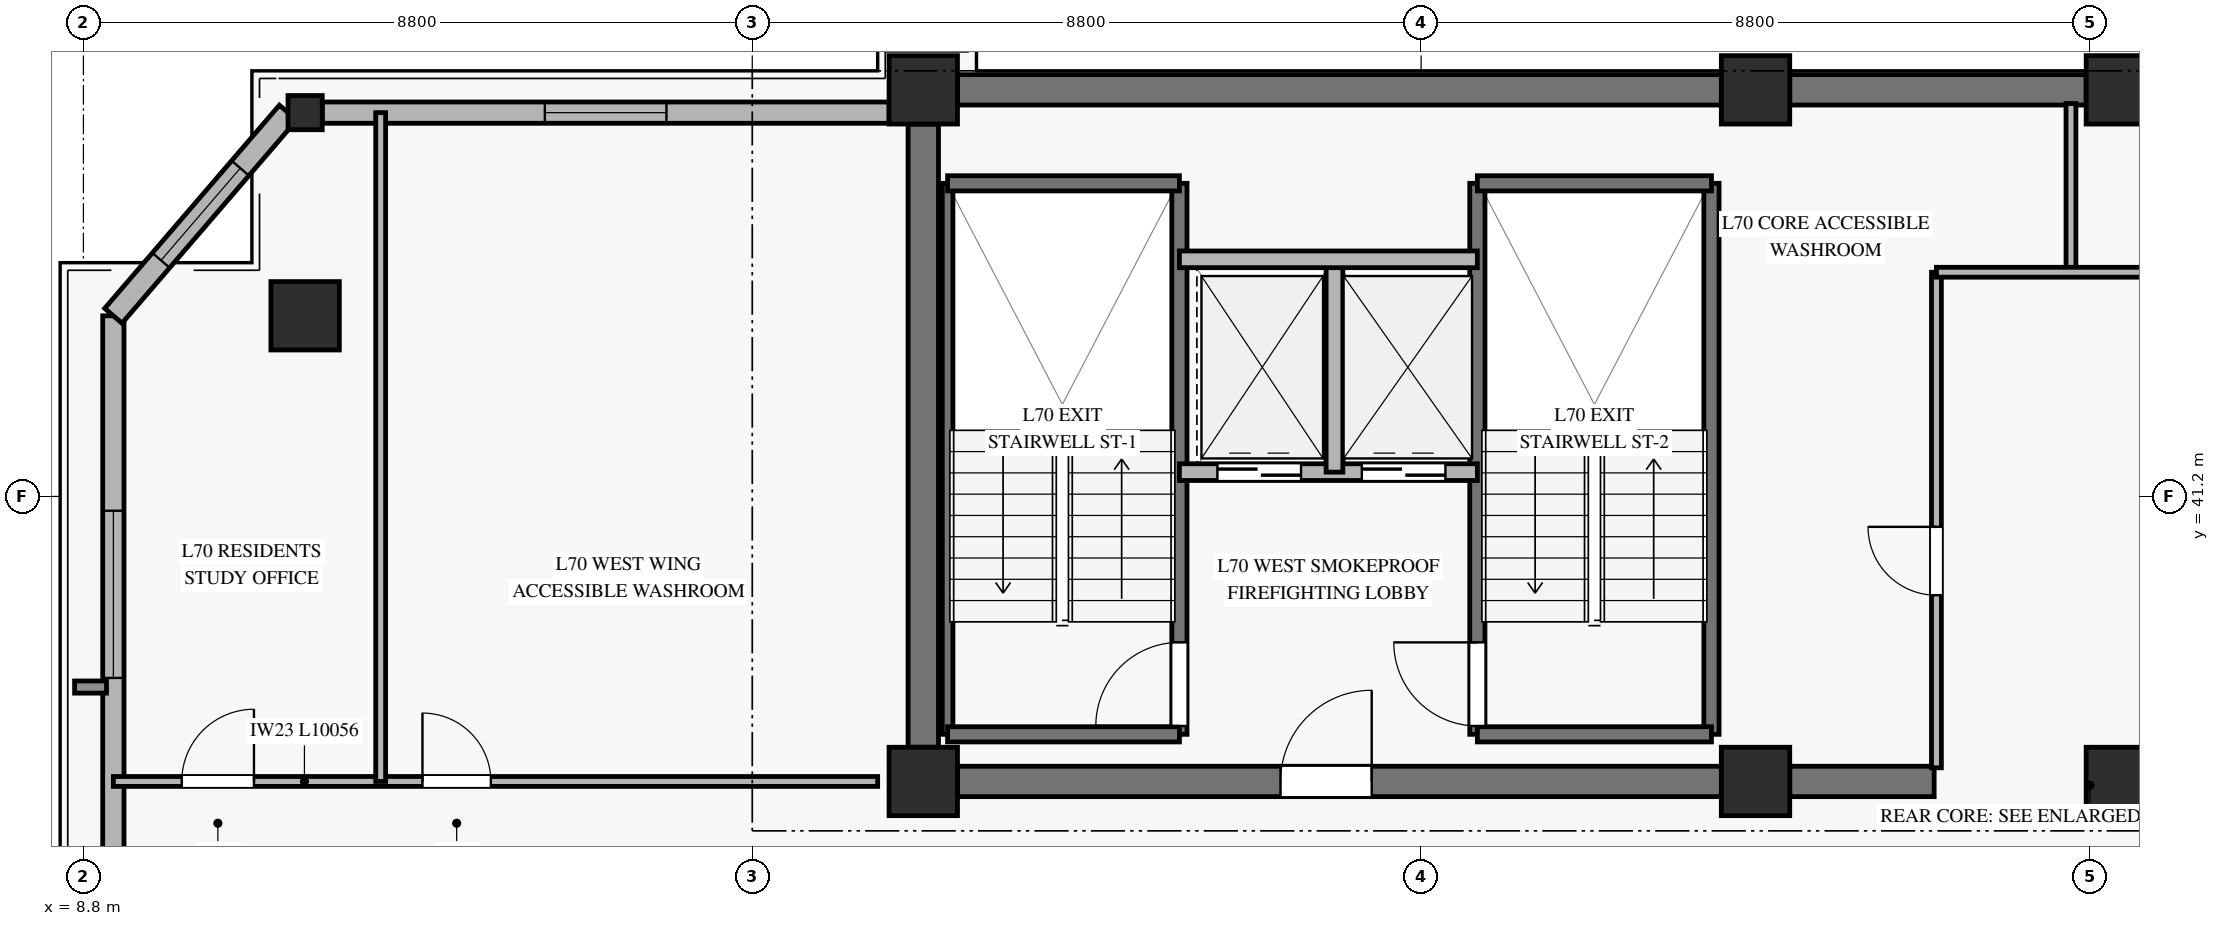
"""IFC4 building model, lengths in metres.
Left out: names, types, materials, properties, quantities, classifications, styles, units other than length and angle.
Written with IfcOpenShell. Run it as: python <this file> out.ifc"""

import sys

from ifc_helpers import new_model, si_unit, direction, frame, frame_2d, origin, origin_2d, place, context, subcontext, project, spatial, rectangle, hollow_rectangle, extrude, source, transform, mapped, element, fill, save


model = new_model("IFC4")
c1 = context("Model", 3, precision=1e-05, world=origin(), true_north=direction((0.0, 1.0)))
c2 = subcontext(c1, "Body", "Model", "MODEL_VIEW")
j1 = project(units=[si_unit("LENGTHUNIT", "METRE"), si_unit("PLANEANGLEUNIT", "RADIAN")], contexts=[c1])
p1 = place(None, origin())
s1 = spatial("IfcSite", under=j1, at=p1, CompositionType="ELEMENT")
p2 = place(p1, origin())
s2 = spatial("IfcBuilding", under=s1, at=p2, CompositionType="ELEMENT")
p3 = place(p2, frame((0.0, 0.0, 272.3)))
s3 = spatial("IfcBuildingStorey", under=s2, at=p3, CompositionType="ELEMENT", Elevation=272.3)
m1 = source(origin(), c2, "Body", "SweptSolid", [
    extrude(rectangle(XDim=0.9, YDim=0.9, at=origin_2d()), origin(), (0.0, 0.0, 1.0), 3.185),
])
for number, where, z_axis, x_axis in (
    (1, (19.85, 37.45, 0.0), (0.0, 0.0, 1.0), (1.0, 0.0, 0.0)),
    (2, (19.85, 46.55, 0.0), (0.0, 0.0, 1.0), (1.0, 0.0, 0.0)),
    (3, (30.8, 37.45, 0.0), (0.0, 0.0, 1.0), (1.0, 0.0, 0.0)),
    (4, (30.8, 46.55, 0.0), (0.0, 0.0, 1.0), (1.0, 0.0, 0.0)),
    (5, (35.6, 37.45, 0.0), (0.0, 0.0, 1.0), (1.0, 0.0, 0.0)),
    (6, (35.6, 46.55, 0.0), (0.0, 0.0, 1.0), (1.0, 0.0, 0.0)),
):
    element("IfcColumn", number, at=place(p3, frame(where, z_axis=z_axis, x_axis=x_axis)), inside=s3, PredefinedType="PILASTER", context=c2, shape_type="MappedRepresentation", body=[
        mapped(m1, transform((0.0, 0.0, 0.0), x_axis=(1.0, 0.0, 0.0), y_axis=(0.0, 1.0, 0.0), z_axis=(0.0, 0.0, 1.0), scale=1.0)),
    ])
p4 = place(p3, frame((20.3, 46.55, 0.0), z_axis=(0.0, 0.0, 1.0), x_axis=(1.0, 0.0, 0.0)))
e7 = element("IfcWall", 7, at=p4, inside=s3, PredefinedType="SHEAR", context=c2, shape_type="SweptSolid", body=[
    extrude(rectangle(XDim=10.05, YDim=0.4, at=frame_2d((5.025, 0.0))), origin(), (0.0, 0.0, 1.0), 3.185),
])
p5 = place(p3, frame((31.25, 46.55, 0.0), z_axis=(0.0, 0.0, 1.0), x_axis=(1.0, 0.0, 0.0)))
e8 = element("IfcWall", 8, at=p5, inside=s3, PredefinedType="SHEAR", context=c2, shape_type="SweptSolid", body=[
    extrude(rectangle(XDim=3.9, YDim=0.4, at=frame_2d((1.95, 0.0))), origin(), (0.0, 0.0, 1.0), 3.185),
])
p6 = place(p3, frame((20.3, 37.45, 0.0), z_axis=(0.0, 0.0, 1.0), x_axis=(1.0, 0.0, 0.0)))
e9 = element("IfcWall", 9, at=p6, inside=s3, PredefinedType="SHEAR", context=c2, shape_type="SweptSolid", body=[
    extrude(rectangle(XDim=10.05, YDim=0.4, at=frame_2d((5.025, 0.0))), origin(), (0.0, 0.0, 1.0), 3.185),
])
p7 = place(p6, frame((4.25, 0.0, 0.0)))
e10 = element("IfcOpeningElement", 10, at=p7, cuts=e9, PredefinedType="OPENING", context=c2, shape_type="SweptSolid", body=[
    extrude(rectangle(XDim=1.2, YDim=2.15, at=frame_2d((0.6, 1.075))), frame((0.0, 0.21, 0.0), z_axis=(0.0, -1.0, 0.0), x_axis=(1.0, 0.0, 0.0)), (0.0, 0.0, 1.0), 0.42),
])
p8 = place(p3, frame((31.25, 37.45, 0.0), z_axis=(0.0, 0.0, 1.0), x_axis=(1.0, 0.0, 0.0)))
e11 = element("IfcWall", 11, at=p8, inside=s3, PredefinedType="SHEAR", context=c2, shape_type="SweptSolid", body=[
    extrude(rectangle(XDim=1.9, YDim=0.4, at=frame_2d((0.95, 0.0))), origin(), (0.0, 0.0, 1.0), 3.185),
])
p9 = place(p3, frame((19.85, 37.9, 0.0), z_axis=(0.0, 0.0, 1.0), x_axis=(0.0, 1.0, 0.0)))
e12 = element("IfcWall", 12, at=p9, inside=s3, PredefinedType="SHEAR", context=c2, shape_type="SweptSolid", body=[
    extrude(rectangle(XDim=8.2, YDim=0.4, at=frame_2d((4.1, 0.0))), origin(), (0.0, 0.0, 1.0), 3.185),
])
m2 = source(origin(), c2, "Body", "SweptSolid", [
    extrude(hollow_rectangle(XDim=0.9, YDim=0.9, WallThickness=0.04, at=origin_2d()), origin(), (0.0, 0.0, 1.0), 3.185),
])
p10 = place(p3, frame((11.717, 43.577, 0.0), z_axis=(0.0, 0.0, 1.0), x_axis=(1.0, 0.0, 0.0)))
e13 = element("IfcColumn", 13, at=p10, inside=s3, PredefinedType="COLUMN", context=c2, shape_type="MappedRepresentation", body=[
    mapped(m2, transform((0.0, 0.0, 0.0), x_axis=(1.0, 0.0, 0.0), y_axis=(0.0, 1.0, 0.0), z_axis=(0.0, 0.0, 1.0), scale=1.0)),
])
m3 = source(origin(), c2, "Body", "SweptSolid", [
    extrude(hollow_rectangle(XDim=0.45, YDim=0.45, WallThickness=0.022, at=origin_2d()), origin(), (0.0, 0.0, 1.0), 3.185),
])
p11 = place(p3, frame((11.717, 46.25, 0.0), z_axis=(0.0, 0.0, 1.0), x_axis=(1.0, 0.0, 0.0)))
e14 = element("IfcColumn", 14, at=p11, inside=s3, PredefinedType="COLUMN", context=c2, shape_type="MappedRepresentation", body=[
    mapped(m3, transform((0.0, 0.0, 0.0), x_axis=(1.0, 0.0, 0.0), y_axis=(0.0, 1.0, 0.0), z_axis=(0.0, 0.0, 1.0), scale=1.0)),
])
p12 = place(p3, frame((9.194, 31.763, 0.0), z_axis=(0.0, 0.0, 1.0), x_axis=(0.0, 1.0, 0.0)))
e15 = element("IfcWall", 15, at=p12, inside=s3, PredefinedType="SOLIDWALL", context=c2, shape_type="SweptSolid", body=[
    extrude(rectangle(XDim=11.814, YDim=0.28, at=frame_2d((5.907, 0.0))), origin(), (0.0, 0.0, 1.0), 2.815),
])
p13 = place(p12, frame((7.049, 0.0, 0.45)))
e16 = element("IfcOpeningElement", 16, at=p13, cuts=e15, PredefinedType="OPENING", context=c2, shape_type="SweptSolid", body=[
    extrude(rectangle(XDim=2.2, YDim=2.1, at=frame_2d((1.1, 1.05))), frame((0.0, 0.15, 0.0), z_axis=(0.0, -1.0, 0.0), x_axis=(1.0, 0.0, 0.0)), (0.0, 0.0, 1.0), 0.3),
])
p14 = place(p3, frame((11.942, 46.25, 0.0), z_axis=(0.0, 0.0, 1.0), x_axis=(1.0, 0.0, 0.0)))
e17 = element("IfcWall", 17, at=p14, inside=s3, PredefinedType="SOLIDWALL", context=c2, shape_type="SweptSolid", body=[
    extrude(rectangle(XDim=7.458, YDim=0.28, at=frame_2d((3.729, 0.0))), origin(), (0.0, 0.0, 1.0), 2.815),
])
p15 = place(p14, frame((2.929, 0.0, 0.45)))
e18 = element("IfcOpeningElement", 18, at=p15, cuts=e17, PredefinedType="OPENING", context=c2, shape_type="SweptSolid", body=[
    extrude(rectangle(XDim=1.6, YDim=2.0, at=frame_2d((0.8, 1.0))), frame((0.0, 0.15, 0.0), z_axis=(0.0, -1.0, 0.0), x_axis=(1.0, 0.0, 0.0)), (0.0, 0.0, 1.0), 0.3),
])
p16 = place(p3, frame((11.492, 46.25, 0.0), z_axis=(0.0, 0.0, 1.0), x_axis=(-0.651874424669, -0.75832693112, 0.0)))
e19 = element("IfcWall", 19, at=p16, inside=s3, PredefinedType="SOLIDWALL", context=c2, shape_type="SweptSolid", body=[
    extrude(rectangle(XDim=3.525, YDim=0.3, at=frame_2d((1.762, 0.0))), origin(), (0.0, 0.0, 1.0), 2.815),
])
p17 = place(p16, frame((0.963, 0.0, 0.45)))
e20 = element("IfcOpeningElement", 20, at=p17, cuts=e19, PredefinedType="OPENING", context=c2, shape_type="SweptSolid", body=[
    extrude(rectangle(XDim=1.6, YDim=2.0, at=frame_2d((0.8, 1.0))), frame((0.0, 0.16, 0.0), z_axis=(0.0, -1.0, 0.0), x_axis=(1.0, 0.0, 0.0)), (0.0, 0.0, 1.0), 0.32),
])
p18 = place(p3, frame((20.17, 38.07, 0.0), z_axis=(0.0, 0.0, 1.0), x_axis=(0.0, 1.0, 0.0)))
e21 = element("IfcWall", 21, at=p18, inside=s3, PredefinedType="SOLIDWALL", context=c2, shape_type="SweptSolid", body=[
    extrude(rectangle(XDim=7.25, YDim=0.14, at=frame_2d((3.625, 0.0))), origin(), (0.0, 0.0, 1.0), 3.4),
])
p19 = place(p3, frame((23.22, 38.07, 0.0), z_axis=(0.0, 0.0, 1.0), x_axis=(0.0, 1.0, 0.0)))
e22 = element("IfcWall", 22, at=p19, inside=s3, PredefinedType="SOLIDWALL", context=c2, shape_type="SweptSolid", body=[
    extrude(rectangle(XDim=7.25, YDim=0.2, at=frame_2d((3.625, 0.0))), origin(), (0.0, 0.0, 1.0), 3.4),
])
p20 = place(p19, frame((0.11, 0.0, 0.0)))
e23 = element("IfcOpeningElement", 23, at=p20, cuts=e22, PredefinedType="OPENING", context=c2, shape_type="SweptSolid", body=[
    extrude(rectangle(XDim=1.1, YDim=2.15, at=frame_2d((0.55, 1.075))), frame((0.0, 0.11, 0.0), z_axis=(0.0, -1.0, 0.0), x_axis=(1.0, 0.0, 0.0)), (0.0, 0.0, 1.0), 0.22),
])
for number, where, z_axis, x_axis in (
    (24, (20.17, 45.32, 0.0), (0.0, 0.0, 1.0), (1.0, 0.0, 0.0)),
    (25, (20.17, 38.07, 0.0), (0.0, 0.0, 1.0), (1.0, 0.0, 0.0)),
):
    element("IfcWall", number, at=place(p3, frame(where, z_axis=z_axis, x_axis=x_axis)), inside=s3, PredefinedType="SOLIDWALL", context=c2, shape_type="SweptSolid", body=[
        extrude(rectangle(XDim=3.05, YDim=0.2, at=frame_2d((1.525, 0.0))), origin(), (0.0, 0.0, 1.0), 3.4),
    ])
p21 = place(p3, frame((27.14, 38.07, 0.0), z_axis=(0.0, 0.0, 1.0), x_axis=(0.0, 1.0, 0.0)))
e26 = element("IfcWall", 26, at=p21, inside=s3, PredefinedType="SOLIDWALL", context=c2, shape_type="SweptSolid", body=[
    extrude(rectangle(XDim=7.25, YDim=0.2, at=frame_2d((3.625, 0.0))), origin(), (0.0, 0.0, 1.0), 3.4),
])
p22 = place(p21, frame((0.11, 0.0, 0.0)))
e27 = element("IfcOpeningElement", 27, at=p22, cuts=e26, PredefinedType="OPENING", context=c2, shape_type="SweptSolid", body=[
    extrude(rectangle(XDim=1.1, YDim=2.15, at=frame_2d((0.55, 1.075))), frame((0.0, 0.11, 0.0), z_axis=(0.0, -1.0, 0.0), x_axis=(1.0, 0.0, 0.0)), (0.0, 0.0, 1.0), 0.22),
])
p23 = place(p3, frame((30.22, 38.07, 0.0), z_axis=(0.0, 0.0, 1.0), x_axis=(0.0, 1.0, 0.0)))
e28 = element("IfcWall", 28, at=p23, inside=s3, PredefinedType="SOLIDWALL", context=c2, shape_type="SweptSolid", body=[
    extrude(rectangle(XDim=7.25, YDim=0.2, at=frame_2d((3.625, 0.0))), origin(), (0.0, 0.0, 1.0), 3.4),
])
for number, where, z_axis, x_axis in (
    (29, (27.14, 45.32, 0.0), (0.0, 0.0, 1.0), (1.0, 0.0, 0.0)),
    (30, (27.14, 38.07, 0.0), (0.0, 0.0, 1.0), (1.0, 0.0, 0.0)),
):
    element("IfcWall", number, at=place(p3, frame(where, z_axis=z_axis, x_axis=x_axis)), inside=s3, PredefinedType="SOLIDWALL", context=c2, shape_type="SweptSolid", body=[
        extrude(rectangle(XDim=3.08, YDim=0.2, at=frame_2d((1.54, 0.0))), origin(), (0.0, 0.0, 1.0), 3.4),
    ])
p24 = place(p3, frame((23.22, 41.52, 0.0), z_axis=(0.0, 0.0, 1.0), x_axis=(1.0, 0.0, 0.0)))
e31 = element("IfcWall", 31, at=p24, inside=s3, PredefinedType="SOLIDWALL", context=c2, shape_type="SweptSolid", body=[
    extrude(rectangle(XDim=3.92, YDim=0.22, at=frame_2d((1.96, 0.0))), origin(), (0.0, 0.0, 1.0), 3.185),
])
p25 = place(p24, frame((0.5, 0.0, 0.0)))
e32 = element("IfcOpeningElement", 32, at=p25, cuts=e31, PredefinedType="OPENING", context=c2, shape_type="SweptSolid", body=[
    extrude(rectangle(XDim=1.1, YDim=2.2, at=frame_2d((0.55, 1.1))), frame((0.0, 0.12, 0.0), z_axis=(0.0, -1.0, 0.0), x_axis=(1.0, 0.0, 0.0)), (0.0, 0.0, 1.0), 0.24),
])
p26 = place(p24, frame((2.4, 0.0, 0.0)))
e33 = element("IfcOpeningElement", 33, at=p26, cuts=e31, PredefinedType="OPENING", context=c2, shape_type="SweptSolid", body=[
    extrude(rectangle(XDim=1.1, YDim=2.2, at=frame_2d((0.55, 1.1))), frame((0.0, 0.12, 0.0), z_axis=(0.0, -1.0, 0.0), x_axis=(1.0, 0.0, 0.0)), (0.0, 0.0, 1.0), 0.24),
])
p27 = place(p3, frame((25.26, 41.52, 0.0), z_axis=(0.0, 0.0, 1.0), x_axis=(0.0, 1.0, 0.0)))
e34 = element("IfcWall", 34, at=p27, inside=s3, PredefinedType="SOLIDWALL", context=c2, shape_type="SweptSolid", body=[
    extrude(rectangle(XDim=2.8, YDim=0.22, at=frame_2d((1.4, 0.0))), origin(), (0.0, 0.0, 1.0), 3.185),
])
p28 = place(p3, frame((23.22, 44.32, 0.0), z_axis=(0.0, 0.0, 1.0), x_axis=(1.0, 0.0, 0.0)))
e35 = element("IfcWall", 35, at=p28, inside=s3, PredefinedType="SOLIDWALL", context=c2, shape_type="SweptSolid", body=[
    extrude(rectangle(XDim=3.92, YDim=0.22, at=frame_2d((1.96, 0.0))), origin(), (0.0, 0.0, 1.0), 3.185),
])
p29 = place(p3, frame((33.18, 37.63, 0.0), z_axis=(0.0, 0.0, 1.0), x_axis=(0.0, 1.0, 0.0)))
e36 = element("IfcWall", 36, at=p29, inside=s3, PredefinedType="PARTITIONING", context=c2, shape_type="SweptSolid", body=[
    extrude(rectangle(XDim=6.52, YDim=0.13, at=frame_2d((3.26, 0.0))), origin(), (0.0, 0.0, 1.0), 2.27),
])
p30 = place(p29, frame((2.27, 0.0, 0.0)))
e37 = element("IfcOpeningElement", 37, at=p30, cuts=e36, PredefinedType="OPENING", context=c2, shape_type="SweptSolid", body=[
    extrude(rectangle(XDim=0.9, YDim=2.1, at=frame_2d((0.45, 1.05))), frame((0.0, 0.075, 0.0), z_axis=(0.0, -1.0, 0.0), x_axis=(1.0, 0.0, 0.0)), (0.0, 0.0, 1.0), 0.15),
])
p31 = place(p3, frame((34.95, 44.15, 0.0), z_axis=(0.0, 0.0, 1.0), x_axis=(0.0, 1.0, 0.0)))
e38 = element("IfcWall", 38, at=p31, inside=s3, PredefinedType="PARTITIONING", context=c2, shape_type="SweptSolid", body=[
    extrude(rectangle(XDim=2.22, YDim=0.13, at=frame_2d((1.11, 0.0))), origin(), (0.0, 0.0, 1.0), 3.185),
])
p32 = place(p3, frame((33.18, 44.15, 0.0), z_axis=(0.0, 0.0, 1.0), x_axis=(1.0, 0.0, 0.0)))
e39 = element("IfcWall", 39, at=p32, inside=s3, PredefinedType="PARTITIONING", context=c2, shape_type="SweptSolid", body=[
    extrude(rectangle(XDim=2.94, YDim=0.13, at=frame_2d((1.47, 0.0))), origin(), (0.0, 0.0, 1.0), 2.47),
])
p33 = place(p3, frame((9.194, 37.45, 0.0), z_axis=(0.0, 0.0, 1.0), x_axis=(1.0, 0.0, 0.0)))
e40 = element("IfcWall", 40, at=p33, inside=s3, PredefinedType="PARTITIONING", context=c2, shape_type="SweptSolid", body=[
    extrude(rectangle(XDim=10.056, YDim=0.13, at=frame_2d((5.028, 0.0))), origin(), (0.0, 0.0, 1.0), 2.82),
])
p34 = place(p33, frame((0.9, 0.0, 0.0)))
e41 = element("IfcOpeningElement", 41, at=p34, cuts=e40, PredefinedType="OPENING", context=c2, shape_type="SweptSolid", body=[
    extrude(rectangle(XDim=0.95, YDim=2.1, at=frame_2d((0.475, 1.05))), frame((0.0, 0.075, 0.0), z_axis=(0.0, -1.0, 0.0), x_axis=(1.0, 0.0, 0.0)), (0.0, 0.0, 1.0), 0.15),
])
p35 = place(p33, frame((4.067, 0.0, 0.0)))
e42 = element("IfcOpeningElement", 42, at=p35, cuts=e40, PredefinedType="OPENING", context=c2, shape_type="SweptSolid", body=[
    extrude(rectangle(XDim=0.9, YDim=2.1, at=frame_2d((0.45, 1.05))), frame((0.0, 0.075, 0.0), z_axis=(0.0, -1.0, 0.0), x_axis=(1.0, 0.0, 0.0)), (0.0, 0.0, 1.0), 0.15),
])
p36 = place(p3, frame((12.711, 37.45, 0.0), z_axis=(0.0, 0.0, 1.0), x_axis=(0.0, 1.0, 0.0)))
e43 = element("IfcWall", 43, at=p36, inside=s3, PredefinedType="PARTITIONING", context=c2, shape_type="SweptSolid", body=[
    extrude(rectangle(XDim=8.8, YDim=0.13, at=frame_2d((4.4, 0.0))), origin(), (0.0, 0.0, 1.0), 3.185),
])
m4 = source(origin(), c2, "Body", "SweptSolid", [
    extrude(rectangle(XDim=2.2, YDim=2.1, at=frame_2d((1.1, 1.05))), frame((0.0, 0.03, 0.0), z_axis=(0.0, -1.0, 0.0), x_axis=(1.0, 0.0, 0.0)), (0.0, 0.0, 1.0), 0.06),
])
p37 = place(p13, origin())
e44 = element("IfcWindow", 44, at=p37, inside=s3, PartitioningType="SINGLE_PANEL", PredefinedType="WINDOW", context=c2, shape_type="MappedRepresentation", body=[
    mapped(m4, transform((0.0, 0.0, 0.0), x_axis=(1.0, 0.0, 0.0), y_axis=(0.0, 1.0, 0.0), z_axis=(0.0, 0.0, 1.0), scale=1.0)),
])
fill(e16, e44)
m5 = source(origin(), c2, "Body", "SweptSolid", [
    extrude(rectangle(XDim=1.6, YDim=2.0, at=frame_2d((0.8, 1.0))), frame((0.0, 0.03, 0.0), z_axis=(0.0, -1.0, 0.0), x_axis=(1.0, 0.0, 0.0)), (0.0, 0.0, 1.0), 0.06),
])
p38 = place(p15, origin())
e45 = element("IfcWindow", 45, at=p38, inside=s3, PartitioningType="SINGLE_PANEL", PredefinedType="WINDOW", context=c2, shape_type="MappedRepresentation", body=[
    mapped(m5, transform((0.0, 0.0, 0.0), x_axis=(1.0, 0.0, 0.0), y_axis=(0.0, 1.0, 0.0), z_axis=(0.0, 0.0, 1.0), scale=1.0)),
])
fill(e18, e45)
p39 = place(p17, origin())
e46 = element("IfcWindow", 46, at=p39, inside=s3, PartitioningType="SINGLE_PANEL", PredefinedType="WINDOW", context=c2, shape_type="MappedRepresentation", body=[
    mapped(m5, transform((0.0, 0.0, 0.0), x_axis=(1.0, 0.0, 0.0), y_axis=(0.0, 1.0, 0.0), z_axis=(0.0, 0.0, 1.0), scale=1.0)),
])
fill(e20, e46)
m6 = source(origin(), c2, "Body", "SweptSolid", [
    extrude(rectangle(XDim=1.1, YDim=2.15, at=frame_2d((0.55, 1.075))), frame((0.0, 0.025, 0.0), z_axis=(0.0, -1.0, 0.0), x_axis=(1.0, 0.0, 0.0)), (0.0, 0.0, 1.0), 0.05),
])
p40 = place(p20, origin())
e47 = element("IfcDoor", 47, at=p40, inside=s3, OperationType="SINGLE_SWING_LEFT", PredefinedType="DOOR", context=c2, shape_type="MappedRepresentation", body=[
    mapped(m6, transform((0.0, 0.0, 0.0), x_axis=(1.0, 0.0, 0.0), y_axis=(0.0, 1.0, 0.0), z_axis=(0.0, 0.0, 1.0), scale=1.0)),
])
fill(e23, e47)
p41 = place(p22, origin())
e48 = element("IfcDoor", 48, at=p41, inside=s3, OperationType="SINGLE_SWING_RIGHT", PredefinedType="DOOR", context=c2, shape_type="MappedRepresentation", body=[
    mapped(m6, transform((0.0, 0.0, 0.0), x_axis=(1.0, 0.0, 0.0), y_axis=(0.0, 1.0, 0.0), z_axis=(0.0, 0.0, 1.0), scale=1.0)),
])
fill(e27, e48)
m7 = source(origin(), c2, "Body", "SweptSolid", [
    extrude(rectangle(XDim=1.1, YDim=2.2, at=frame_2d((0.55, 1.1))), frame((0.0, 0.025, 0.0), z_axis=(0.0, -1.0, 0.0), x_axis=(1.0, 0.0, 0.0)), (0.0, 0.0, 1.0), 0.05),
])
p42 = place(p25, origin())
e49 = element("IfcDoor", 49, at=p42, inside=s3, OperationType="SLIDING_TO_LEFT", PredefinedType="DOOR", context=c2, shape_type="MappedRepresentation", body=[
    mapped(m7, transform((0.0, 0.0, 0.0), x_axis=(1.0, 0.0, 0.0), y_axis=(0.0, 1.0, 0.0), z_axis=(0.0, 0.0, 1.0), scale=1.0)),
])
fill(e32, e49)
p43 = place(p26, origin())
e50 = element("IfcDoor", 50, at=p43, inside=s3, OperationType="SLIDING_TO_LEFT", PredefinedType="DOOR", context=c2, shape_type="MappedRepresentation", body=[
    mapped(m7, transform((0.0, 0.0, 0.0), x_axis=(1.0, 0.0, 0.0), y_axis=(0.0, 1.0, 0.0), z_axis=(0.0, 0.0, 1.0), scale=1.0)),
])
fill(e33, e50)
m8 = source(origin(), c2, "Body", "SweptSolid", [
    extrude(rectangle(XDim=1.2, YDim=2.15, at=frame_2d((0.6, 1.075))), frame((0.0, 0.025, 0.0), z_axis=(0.0, -1.0, 0.0), x_axis=(1.0, 0.0, 0.0)), (0.0, 0.0, 1.0), 0.05),
])
p44 = place(p7, origin())
e51 = element("IfcDoor", 51, at=p44, inside=s3, OperationType="SINGLE_SWING_RIGHT", PredefinedType="DOOR", context=c2, shape_type="MappedRepresentation", body=[
    mapped(m8, transform((0.0, 0.0, 0.0), x_axis=(1.0, 0.0, 0.0), y_axis=(0.0, 1.0, 0.0), z_axis=(0.0, 0.0, 1.0), scale=1.0)),
])
fill(e10, e51)
m9 = source(origin(), c2, "Body", "SweptSolid", [
    extrude(rectangle(XDim=0.9, YDim=2.1, at=frame_2d((0.45, 1.05))), frame((0.0, 0.025, 0.0), z_axis=(0.0, -1.0, 0.0), x_axis=(1.0, 0.0, 0.0)), (0.0, 0.0, 1.0), 0.05),
])
p45 = place(p30, origin())
e52 = element("IfcDoor", 52, at=p45, inside=s3, OperationType="SINGLE_SWING_RIGHT", PredefinedType="DOOR", context=c2, shape_type="MappedRepresentation", body=[
    mapped(m9, transform((0.0, 0.0, 0.0), x_axis=(1.0, 0.0, 0.0), y_axis=(0.0, 1.0, 0.0), z_axis=(0.0, 0.0, 1.0), scale=1.0)),
])
fill(e37, e52)
m10 = source(origin(), c2, "Body", "SweptSolid", [
    extrude(rectangle(XDim=0.95, YDim=2.1, at=frame_2d((0.475, 1.05))), frame((0.0, 0.025, 0.0), z_axis=(0.0, -1.0, 0.0), x_axis=(1.0, 0.0, 0.0)), (0.0, 0.0, 1.0), 0.05),
])
p46 = place(p34, origin())
e53 = element("IfcDoor", 53, at=p46, inside=s3, OperationType="SINGLE_SWING_RIGHT", PredefinedType="DOOR", context=c2, shape_type="MappedRepresentation", body=[
    mapped(m10, transform((0.0, 0.0, 0.0), x_axis=(1.0, 0.0, 0.0), y_axis=(0.0, 1.0, 0.0), z_axis=(0.0, 0.0, 1.0), scale=1.0)),
])
fill(e41, e53)
p47 = place(p35, origin())
e54 = element("IfcDoor", 54, at=p47, inside=s3, OperationType="SINGLE_SWING_LEFT", PredefinedType="DOOR", context=c2, shape_type="MappedRepresentation", body=[
    mapped(m9, transform((0.0, 0.0, 0.0), x_axis=(1.0, 0.0, 0.0), y_axis=(0.0, 1.0, 0.0), z_axis=(0.0, 0.0, 1.0), scale=1.0)),
])
fill(e42, e54)
save(model, sys.argv[1])
